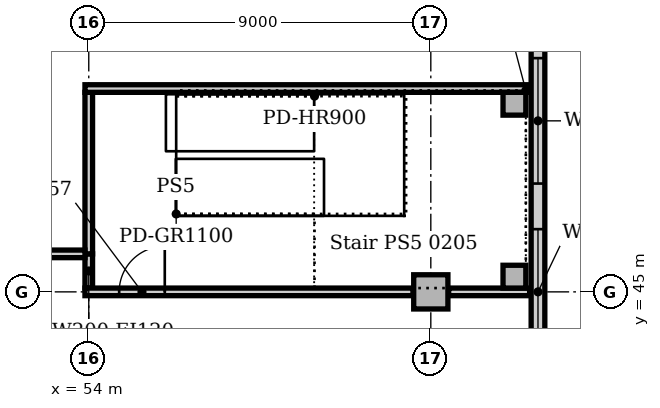
"""IFC4 building model, lengths in metres.
Left out: names, types, materials, properties, quantities, classifications, styles, units other than length and angle.
Written with IfcOpenShell. Run it as: python <this file> out.ifc"""

import sys

from ifc_helpers import new_model, si_unit, direction, frame, frame_2d, origin, origin_2d, place, context, subcontext, project, spatial, rectangle, extrude, element, fill, save


model = new_model("IFC4")
c1 = context("Model", 3, precision=1e-05, world=origin(), true_north=direction((0.0, 1.0)))
c2 = subcontext(c1, "Body", "Model", "MODEL_VIEW")
j1 = project(units=[si_unit("LENGTHUNIT", "METRE"), si_unit("PLANEANGLEUNIT", "RADIAN")], contexts=[c1])
p1 = place(None, origin())
s1 = spatial("IfcSite", under=j1, at=p1, CompositionType="ELEMENT")
p2 = place(p1, origin())
s2 = spatial("IfcBuilding", under=s1, at=p2, CompositionType="ELEMENT")
p3 = place(p2, frame((0.0, 0.0, 11.0)))
s3 = spatial("IfcBuildingStorey", under=s2, at=p3, CompositionType="ELEMENT", Elevation=11.0)
p4 = place(p3, frame((63.0, 45.0, 0.0), z_axis=(0.0, 0.0, 1.0), x_axis=(1.0, 0.0, 0.0)))
e1 = element("IfcColumn", 1, at=p4, inside=s3, PredefinedType="COLUMN", context=c2, shape_type="SweptSolid", body=[
    extrude(rectangle(XDim=0.9, YDim=0.9, at=origin_2d()), origin(), (0.0, 0.0, 1.0), 4.7),
])
p5 = place(p3, frame((65.82, -9.0, 0.0), z_axis=(0.0, 0.0, 1.0), x_axis=(0.0, 1.0, 0.0)))
e2 = element("IfcWall", 2, at=p5, inside=s3, PredefinedType="STANDARD", context=c2, shape_type="SweptSolid", body=[
    extrude(rectangle(XDim=63.0, YDim=0.36, at=frame_2d((31.5, 0.0))), origin(), (0.0, 0.0, 1.0), 4.7),
])
p6 = place(p5, frame((2.85, 0.0, 0.9)))
e3 = element("IfcOpeningElement", 3, at=p6, cuts=e2, PredefinedType="OPENING", context=c2, shape_type="SweptSolid", body=[
    extrude(rectangle(XDim=3.3, YDim=2.4, at=frame_2d((1.65, 1.2))), frame((0.0, 0.19, 0.0), z_axis=(0.0, -1.0, 0.0), x_axis=(1.0, 0.0, 0.0)), (0.0, 0.0, 1.0), 0.38),
])
p7 = place(p5, frame((7.35, 0.0, 0.9)))
e4 = element("IfcOpeningElement", 4, at=p7, cuts=e2, PredefinedType="OPENING", context=c2, shape_type="SweptSolid", body=[
    extrude(rectangle(XDim=3.3, YDim=2.4, at=frame_2d((1.65, 1.2))), frame((0.0, 0.19, 0.0), z_axis=(0.0, -1.0, 0.0), x_axis=(1.0, 0.0, 0.0)), (0.0, 0.0, 1.0), 0.38),
])
p8 = place(p5, frame((11.85, 0.0, 0.9)))
e5 = element("IfcOpeningElement", 5, at=p8, cuts=e2, PredefinedType="OPENING", context=c2, shape_type="SweptSolid", body=[
    extrude(rectangle(XDim=3.3, YDim=2.4, at=frame_2d((1.65, 1.2))), frame((0.0, 0.19, 0.0), z_axis=(0.0, -1.0, 0.0), x_axis=(1.0, 0.0, 0.0)), (0.0, 0.0, 1.0), 0.38),
])
p9 = place(p5, frame((16.35, 0.0, 0.9)))
e6 = element("IfcOpeningElement", 6, at=p9, cuts=e2, PredefinedType="OPENING", context=c2, shape_type="SweptSolid", body=[
    extrude(rectangle(XDim=3.3, YDim=2.4, at=frame_2d((1.65, 1.2))), frame((0.0, 0.19, 0.0), z_axis=(0.0, -1.0, 0.0), x_axis=(1.0, 0.0, 0.0)), (0.0, 0.0, 1.0), 0.38),
])
p10 = place(p5, frame((20.85, 0.0, 0.9)))
e7 = element("IfcOpeningElement", 7, at=p10, cuts=e2, PredefinedType="OPENING", context=c2, shape_type="SweptSolid", body=[
    extrude(rectangle(XDim=3.3, YDim=2.4, at=frame_2d((1.65, 1.2))), frame((0.0, 0.19, 0.0), z_axis=(0.0, -1.0, 0.0), x_axis=(1.0, 0.0, 0.0)), (0.0, 0.0, 1.0), 0.38),
])
p11 = place(p5, frame((25.35, 0.0, 0.9)))
e8 = element("IfcOpeningElement", 8, at=p11, cuts=e2, PredefinedType="OPENING", context=c2, shape_type="SweptSolid", body=[
    extrude(rectangle(XDim=3.3, YDim=2.4, at=frame_2d((1.65, 1.2))), frame((0.0, 0.19, 0.0), z_axis=(0.0, -1.0, 0.0), x_axis=(1.0, 0.0, 0.0)), (0.0, 0.0, 1.0), 0.38),
])
p12 = place(p5, frame((29.85, 0.0, 0.9)))
e9 = element("IfcOpeningElement", 9, at=p12, cuts=e2, PredefinedType="OPENING", context=c2, shape_type="SweptSolid", body=[
    extrude(rectangle(XDim=3.3, YDim=2.4, at=frame_2d((1.65, 1.2))), frame((0.0, 0.19, 0.0), z_axis=(0.0, -1.0, 0.0), x_axis=(1.0, 0.0, 0.0)), (0.0, 0.0, 1.0), 0.38),
])
p13 = place(p5, frame((34.35, 0.0, 0.9)))
e10 = element("IfcOpeningElement", 10, at=p13, cuts=e2, PredefinedType="OPENING", context=c2, shape_type="SweptSolid", body=[
    extrude(rectangle(XDim=3.3, YDim=2.4, at=frame_2d((1.65, 1.2))), frame((0.0, 0.19, 0.0), z_axis=(0.0, -1.0, 0.0), x_axis=(1.0, 0.0, 0.0)), (0.0, 0.0, 1.0), 0.38),
])
p14 = place(p5, frame((38.85, 0.0, 0.9)))
e11 = element("IfcOpeningElement", 11, at=p14, cuts=e2, PredefinedType="OPENING", context=c2, shape_type="SweptSolid", body=[
    extrude(rectangle(XDim=3.3, YDim=2.4, at=frame_2d((1.65, 1.2))), frame((0.0, 0.19, 0.0), z_axis=(0.0, -1.0, 0.0), x_axis=(1.0, 0.0, 0.0)), (0.0, 0.0, 1.0), 0.38),
])
p15 = place(p5, frame((43.35, 0.0, 0.9)))
e12 = element("IfcOpeningElement", 12, at=p15, cuts=e2, PredefinedType="OPENING", context=c2, shape_type="SweptSolid", body=[
    extrude(rectangle(XDim=3.3, YDim=2.4, at=frame_2d((1.65, 1.2))), frame((0.0, 0.19, 0.0), z_axis=(0.0, -1.0, 0.0), x_axis=(1.0, 0.0, 0.0)), (0.0, 0.0, 1.0), 0.38),
])
p16 = place(p5, frame((47.85, 0.0, 0.9)))
e13 = element("IfcOpeningElement", 13, at=p16, cuts=e2, PredefinedType="OPENING", context=c2, shape_type="SweptSolid", body=[
    extrude(rectangle(XDim=3.3, YDim=2.4, at=frame_2d((1.65, 1.2))), frame((0.0, 0.19, 0.0), z_axis=(0.0, -1.0, 0.0), x_axis=(1.0, 0.0, 0.0)), (0.0, 0.0, 1.0), 0.38),
])
p17 = place(p5, frame((52.35, 0.0, 0.9)))
e14 = element("IfcOpeningElement", 14, at=p17, cuts=e2, PredefinedType="OPENING", context=c2, shape_type="SweptSolid", body=[
    extrude(rectangle(XDim=3.3, YDim=2.4, at=frame_2d((1.65, 1.2))), frame((0.0, 0.19, 0.0), z_axis=(0.0, -1.0, 0.0), x_axis=(1.0, 0.0, 0.0)), (0.0, 0.0, 1.0), 0.38),
])
p18 = place(p5, frame((56.85, 0.0, 0.9)))
e15 = element("IfcOpeningElement", 15, at=p18, cuts=e2, PredefinedType="OPENING", context=c2, shape_type="SweptSolid", body=[
    extrude(rectangle(XDim=3.3, YDim=2.4, at=frame_2d((1.65, 1.2))), frame((0.0, 0.19, 0.0), z_axis=(0.0, -1.0, 0.0), x_axis=(1.0, 0.0, 0.0)), (0.0, 0.0, 1.0), 0.38),
])
for number, where, z_axis, x_axis in (
    (16, (65.2, 49.95, 0.0), (0.0, 0.0, 1.0), (1.0, 0.0, 0.0)),
    (17, (65.2, 45.4, 0.0), (0.0, 0.0, 1.0), (1.0, 0.0, 0.0)),
):
    element("IfcColumn", number, at=place(p3, frame(where, z_axis=z_axis, x_axis=x_axis)), inside=s3, PredefinedType="COLUMN", context=c2, shape_type="SweptSolid", body=[
        extrude(rectangle(XDim=0.6, YDim=0.6, at=origin_2d()), origin(), (0.0, 0.0, 1.0), 5.0),
    ])
p19 = place(p3, frame((54.0, 45.1, 0.0), z_axis=(0.0, 0.0, 1.0), x_axis=(0.0, 1.0, 0.0)))
e18 = element("IfcWall", 18, at=p19, inside=s3, PredefinedType="SOLIDWALL", context=c2, shape_type="SweptSolid", body=[
    extrude(rectangle(XDim=0.9, YDim=0.2, at=frame_2d((0.45, 0.0))), origin(), (0.0, 0.0, 1.0), 4.7),
])
p20 = place(p3, frame((53.9, 45.0, 0.0), z_axis=(0.0, 0.0, 1.0), x_axis=(1.0, 0.0, 0.0)))
e19 = element("IfcWall", 19, at=p20, inside=s3, PredefinedType="SOLIDWALL", context=c2, shape_type="SweptSolid", body=[
    extrude(rectangle(XDim=8.63, YDim=0.2, at=frame_2d((4.315, 0.0))), origin(), (0.0, 0.0, 1.0), 4.7),
])
p21 = place(p20, frame((0.9, 0.0, 0.0)))
e20 = element("IfcOpeningElement", 20, at=p21, cuts=e19, PredefinedType="OPENING", context=c2, shape_type="SweptSolid", body=[
    extrude(rectangle(XDim=1.2, YDim=2.1, at=frame_2d((0.6, 1.05))), frame((0.0, 0.11, 0.0), z_axis=(0.0, -1.0, 0.0), x_axis=(1.0, 0.0, 0.0)), (0.0, 0.0, 1.0), 0.22),
])
p22 = place(p3, frame((63.47, 45.0, 0.0), z_axis=(0.0, 0.0, 1.0), x_axis=(1.0, 0.0, 0.0)))
e21 = element("IfcWall", 21, at=p22, inside=s3, PredefinedType="SOLIDWALL", context=c2, shape_type="SweptSolid", body=[
    extrude(rectangle(XDim=2.13, YDim=0.2, at=frame_2d((1.065, 0.0))), origin(), (0.0, 0.0, 1.0), 4.7),
])
p23 = place(p3, frame((54.0, 46.0, 0.0), z_axis=(0.0, 0.0, 1.0), x_axis=(0.0, 1.0, 0.0)))
e22 = element("IfcWall", 22, at=p23, inside=s3, PredefinedType="SOLIDWALL", context=c2, shape_type="SweptSolid", body=[
    extrude(rectangle(XDim=4.25, YDim=0.2, at=frame_2d((2.125, 0.0))), origin(), (0.0, 0.0, 1.0), 4.7),
])
p24 = place(p3, frame((53.9, 50.35, 0.0), z_axis=(0.0, 0.0, 1.0), x_axis=(1.0, 0.0, 0.0)))
e23 = element("IfcWall", 23, at=p24, inside=s3, PredefinedType="SOLIDWALL", context=c2, shape_type="SweptSolid", body=[
    extrude(rectangle(XDim=11.7, YDim=0.2, at=frame_2d((5.85, 0.0))), origin(), (0.0, 0.0, 1.0), 4.7),
])
p25 = place(p3, frame((45.1, 46.0, 0.0), z_axis=(0.0, 0.0, 1.0), x_axis=(1.0, 0.0, 0.0)))
e24 = element("IfcWall", 24, at=p25, inside=s3, PredefinedType="PARTITIONING", context=c2, shape_type="SweptSolid", body=[
    extrude(rectangle(XDim=8.8, YDim=0.2, at=frame_2d((4.4, 0.0))), origin(), (0.0, 0.0, 1.0), 4.7),
])
p26 = place(p25, frame((3.5, 0.0, 0.0)))
e25 = element("IfcOpeningElement", 25, at=p26, cuts=e24, PredefinedType="OPENING", context=c2, shape_type="SweptSolid", body=[
    extrude(rectangle(XDim=1.8, YDim=2.1, at=frame_2d((0.9, 1.05))), frame((0.0, 0.11, 0.0), z_axis=(0.0, -1.0, 0.0), x_axis=(1.0, 0.0, 0.0)), (0.0, 0.0, 1.0), 0.22),
])
p27 = place(p17, origin())
e26 = element("IfcWindow", 26, at=p27, inside=s3, PartitioningType="SINGLE_PANEL", PredefinedType="WINDOW", context=c2, shape_type="SweptSolid", body=[
    extrude(rectangle(XDim=3.3, YDim=2.4, at=frame_2d((1.65, 1.2))), frame((0.0, 0.13, 0.0), z_axis=(0.0, -1.0, 0.0), x_axis=(1.0, 0.0, 0.0)), (0.0, 0.0, 1.0), 0.06),
])
fill(e14, e26)
p28 = place(p18, origin())
e27 = element("IfcWindow", 27, at=p28, inside=s3, PartitioningType="SINGLE_PANEL", PredefinedType="WINDOW", context=c2, shape_type="SweptSolid", body=[
    extrude(rectangle(XDim=3.3, YDim=2.4, at=frame_2d((1.65, 1.2))), frame((0.0, 0.13, 0.0), z_axis=(0.0, -1.0, 0.0), x_axis=(1.0, 0.0, 0.0)), (0.0, 0.0, 1.0), 0.06),
])
fill(e15, e27)
p29 = place(p21, origin())
e28 = element("IfcDoor", 28, at=p29, inside=s3, OperationType="SINGLE_SWING_RIGHT", PredefinedType="DOOR", context=c2, shape_type="SweptSolid", body=[
    extrude(rectangle(XDim=1.2, YDim=2.1, at=frame_2d((0.6, 1.05))), frame((0.0, 0.025, 0.0), z_axis=(0.0, -1.0, 0.0), x_axis=(1.0, 0.0, 0.0)), (0.0, 0.0, 1.0), 0.05),
])
fill(e20, e28)
save(model, sys.argv[1])
